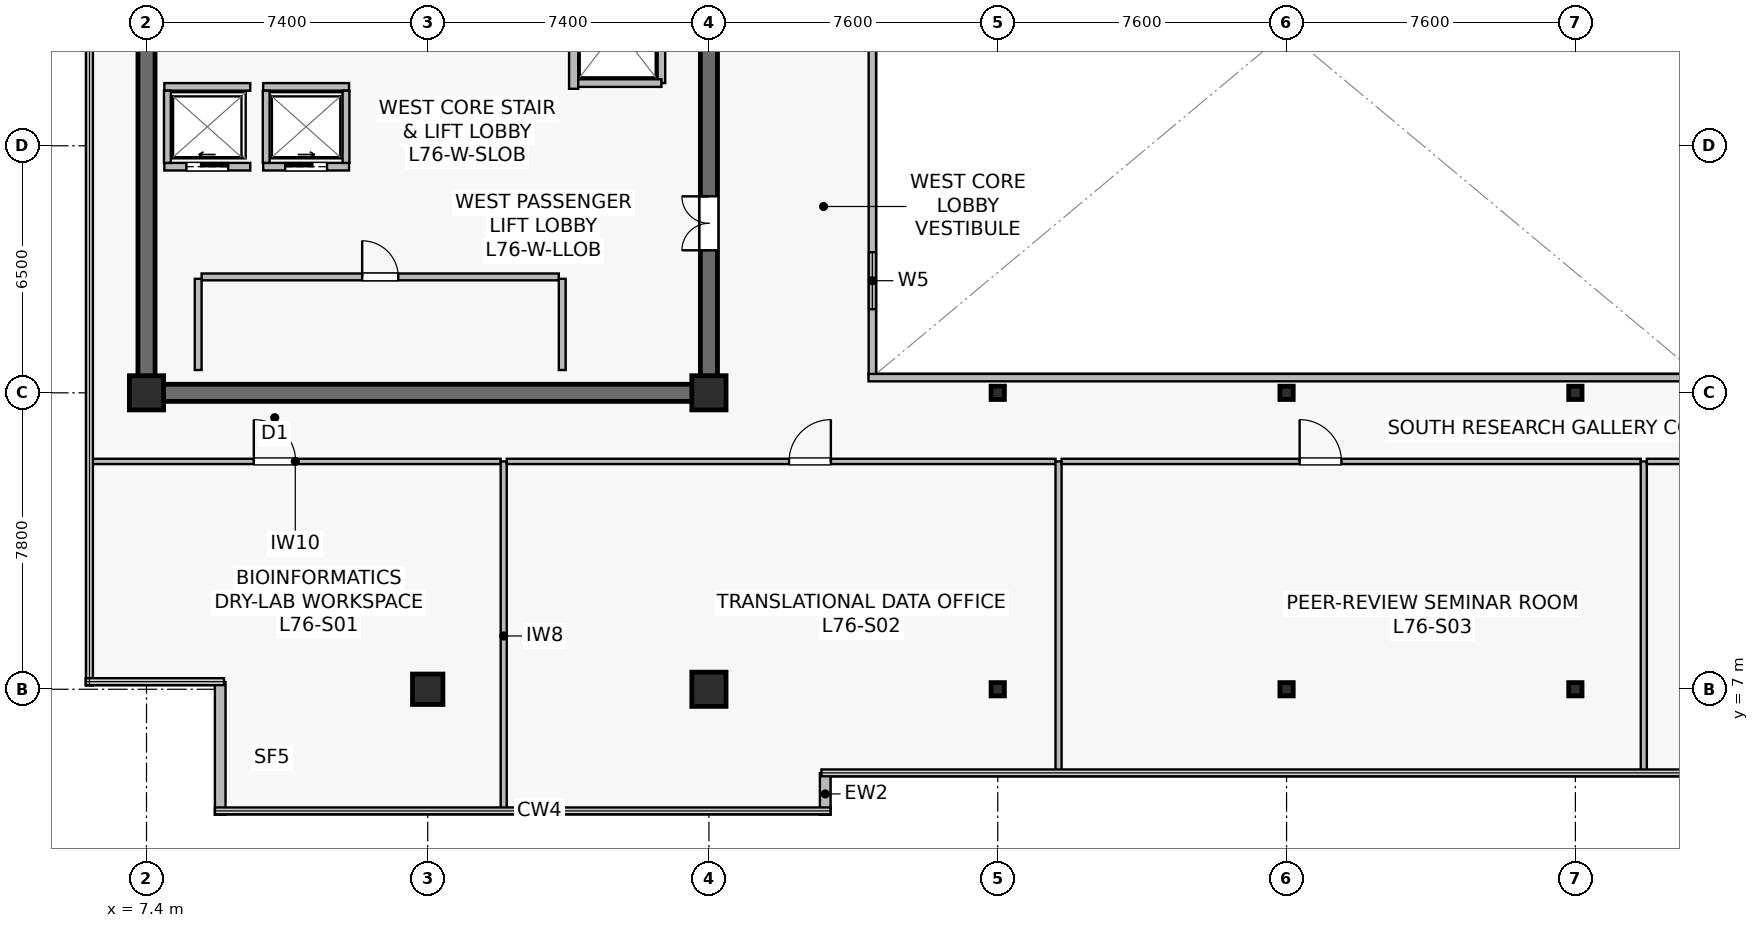
"""IFC4 building model, lengths in metres.
Left out: names, types, materials, properties, quantities, classifications, styles, units other than length and angle.
Written with IfcOpenShell. Run it as: python <this file> out.ifc"""

import sys

from ifc_helpers import new_model, si_unit, direction, frame, frame_2d, origin, origin_2d, place, context, subcontext, project, spatial, rectangle, i_section, extrude, source, transform, mapped, element, fill, save


model = new_model("IFC4")
c1 = context("Model", 3, precision=1e-05, world=origin(), true_north=direction((0.0, 1.0)))
c2 = subcontext(c1, "Body", "Model", "MODEL_VIEW")
j1 = project(units=[si_unit("LENGTHUNIT", "METRE"), si_unit("PLANEANGLEUNIT", "RADIAN")], contexts=[c1])
p1 = place(None, origin())
s1 = spatial("IfcSite", under=j1, at=p1, CompositionType="ELEMENT")
p2 = place(p1, origin())
s2 = spatial("IfcBuilding", under=s1, at=p2, CompositionType="ELEMENT")
p3 = place(p2, frame((0.0, 0.0, 318.6)))
s3 = spatial("IfcBuildingStorey", under=s2, at=p3, CompositionType="ELEMENT", Elevation=318.6)
p4 = place(p3, frame((7.175, 14.8, 0.0), z_axis=(0.0, 0.0, 1.0), x_axis=(1.0, 0.0, 0.0)))
e1 = element("IfcWall", 1, at=p4, inside=s3, PredefinedType="SHEAR", context=c2, shape_type="SweptSolid", body=[
    extrude(rectangle(XDim=15.25, YDim=0.45, at=frame_2d((7.625, 0.0))), origin(), (0.0, 0.0, 1.0), 3.9),
])
p5 = place(p3, frame((7.4, 15.025, 0.0), z_axis=(0.0, 0.0, 1.0), x_axis=(0.0, 1.0, 0.0)))
e2 = element("IfcWall", 2, at=p5, inside=s3, PredefinedType="SHEAR", context=c2, shape_type="SweptSolid", body=[
    extrude(rectangle(XDim=18.55, YDim=0.45, at=frame_2d((9.275, 0.0))), origin(), (0.0, 0.0, 1.0), 3.9),
])
p6 = place(p3, frame((22.2, 15.025, 0.0), z_axis=(0.0, 0.0, 1.0), x_axis=(0.0, 1.0, 0.0)))
e3 = element("IfcWall", 3, at=p6, inside=s3, PredefinedType="SHEAR", context=c2, shape_type="SweptSolid", body=[
    extrude(rectangle(XDim=18.55, YDim=0.45, at=frame_2d((9.275, 0.0))), origin(), (0.0, 0.0, 1.0), 3.9),
])
p7 = place(p6, frame((3.525, 0.0, 0.0)))
e4 = element("IfcOpeningElement", 4, at=p7, cuts=e3, PredefinedType="OPENING", context=c2, shape_type="SweptSolid", body=[
    extrude(rectangle(XDim=1.42, YDim=2.2, at=frame_2d((0.71, 1.1))), frame((0.0, 0.235, 0.0), z_axis=(0.0, -1.0, 0.0), x_axis=(1.0, 0.0, 0.0)), (0.0, 0.0, 1.0), 0.47),
])
m1 = source(origin(), c2, "Body", "SweptSolid", [
    extrude(rectangle(XDim=0.8, YDim=0.8, at=origin_2d()), origin(), (0.0, 0.0, 1.0), 4.2),
])
p8 = place(p3, frame((14.8, 7.0, 0.0), z_axis=(0.0, 0.0, 1.0), x_axis=(1.0, 0.0, 0.0)))
e5 = element("IfcColumn", 5, at=p8, inside=s3, PredefinedType="COLUMN", context=c2, shape_type="MappedRepresentation", body=[
    mapped(m1, transform((0.0, 0.0, 0.0), scale=1.0)),
])
m2 = source(origin(), c2, "Body", "SweptSolid", [
    extrude(rectangle(XDim=0.9, YDim=0.9, at=origin_2d()), origin(), (0.0, 0.0, 1.0), 4.2),
])
for number, where, z_axis, x_axis in (
    (6, (22.2, 7.0, 0.0), (0.0, 0.0, 1.0), (1.0, 0.0, 0.0)),
    (7, (7.4, 14.8, 0.0), (0.0, 0.0, 1.0), (1.0, 0.0, 0.0)),
    (8, (22.2, 14.8, 0.0), (0.0, 0.0, 1.0), (1.0, 0.0, 0.0)),
):
    element("IfcColumn", number, at=place(p3, frame(where, z_axis=z_axis, x_axis=x_axis)), inside=s3, PredefinedType="COLUMN", context=c2, shape_type="MappedRepresentation", body=[
        mapped(m2, transform((0.0, 0.0, 0.0), scale=1.0)),
    ])
m3 = source(origin(), c2, "Body", "SweptSolid", [
    extrude(i_section(OverallWidth=0.35, OverallDepth=0.35, WebThickness=0.012, FlangeThickness=0.019, at=origin_2d()), origin(), (0.0, 0.0, 1.0), 4.2),
])
for number, where, z_axis, x_axis in (
    (9, (29.8, 7.0, 0.0), (0.0, 0.0, 1.0), (1.0, 0.0, 0.0)),
    (10, (29.8, 14.8, 0.0), (0.0, 0.0, 1.0), (1.0, 0.0, 0.0)),
    (11, (37.4, 7.0, 0.0), (0.0, 0.0, 1.0), (1.0, 0.0, 0.0)),
    (12, (37.4, 14.8, 0.0), (0.0, 0.0, 1.0), (1.0, 0.0, 0.0)),
    (13, (45.0, 7.0, 0.0), (0.0, 0.0, 1.0), (1.0, 0.0, 0.0)),
    (14, (45.0, 14.8, 0.0), (0.0, 0.0, 1.0), (1.0, 0.0, 0.0)),
):
    element("IfcColumn", number, at=place(p3, frame(where, z_axis=z_axis, x_axis=x_axis)), inside=s3, PredefinedType="COLUMN", context=c2, shape_type="MappedRepresentation", body=[
        mapped(m3, transform((0.0, 0.0, 0.0), scale=1.0)),
    ])
p9 = place(p3, frame((25.26, 3.7, 0.0), z_axis=(0.0, 0.0, 1.0), x_axis=(0.0, 1.0, 0.0)))
e15 = element("IfcWall", 15, at=p9, inside=s3, PredefinedType="STANDARD", context=c2, shape_type="SweptSolid", body=[
    extrude(rectangle(XDim=1.093, YDim=0.28, at=frame_2d((0.546, 0.0))), origin(), (0.0, 0.0, 1.0), 3.9),
])
p10 = place(p3, frame((9.34, 7.188, 0.0), z_axis=(0.0, 0.0, 1.0), x_axis=(0.0, -1.0, 0.0)))
e16 = element("IfcWall", 16, at=p10, inside=s3, PredefinedType="STANDARD", context=c2, shape_type="SweptSolid", body=[
    extrude(rectangle(XDim=3.488, YDim=0.28, at=frame_2d((1.744, 0.0))), origin(), (0.0, 0.0, 1.0), 3.9),
])
p11 = place(p3, frame((18.64, 22.8, 0.0), z_axis=(0.0, 0.0, 1.0), x_axis=(0.0, 1.0, 0.0)))
e17 = element("IfcWall", 17, at=p11, inside=s3, PredefinedType="SOLIDWALL", context=c2, shape_type="SweptSolid", body=[
    extrude(rectangle(XDim=6.85, YDim=0.24, at=frame_2d((3.425, 0.0))), origin(), (0.0, 0.0, 1.0), 3.035),
])
p12 = place(p11, frame((4.85, 0.0, 0.0)))
e18 = element("IfcOpeningElement", 18, at=p12, cuts=e17, PredefinedType="OPENING", context=c2, shape_type="SweptSolid", body=[
    extrude(rectangle(XDim=1.1, YDim=2.22, at=frame_2d((0.55, 1.11))), frame((0.0, 0.13, 0.0), z_axis=(0.0, -1.0, 0.0), x_axis=(1.0, 0.0, 0.0)), (0.0, 0.0, 1.0), 0.26),
])
p13 = place(p11, frame((1.0, 0.0, 0.0)))
e19 = element("IfcOpeningElement", 19, at=p13, cuts=e17, PredefinedType="OPENING", context=c2, shape_type="SweptSolid", body=[
    extrude(rectangle(XDim=1.2, YDim=2.22, at=frame_2d((0.6, 1.11))), frame((0.0, 0.13, 0.0), z_axis=(0.0, -1.0, 0.0), x_axis=(1.0, 0.0, 0.0)), (0.0, 0.0, 1.0), 0.26),
])
p14 = place(p3, frame((7.87, 20.75, 0.0), z_axis=(0.0, 0.0, 1.0), x_axis=(1.0, 0.0, 0.0)))
e20 = element("IfcWall", 20, at=p14, inside=s3, PredefinedType="SOLIDWALL", context=c2, shape_type="SweptSolid", body=[
    extrude(rectangle(XDim=2.26, YDim=0.2, at=frame_2d((1.13, 0.0))), origin(), (0.0, 0.0, 1.0), 3.9),
])
p15 = place(p14, frame((0.58, 0.0, 0.0)))
e21 = element("IfcOpeningElement", 21, at=p15, cuts=e20, PredefinedType="OPENING", context=c2, shape_type="SweptSolid", body=[
    extrude(rectangle(XDim=1.1, YDim=2.22, at=frame_2d((0.55, 1.11))), frame((0.0, 0.11, 0.0), z_axis=(0.0, -1.0, 0.0), x_axis=(1.0, 0.0, 0.0)), (0.0, 0.0, 1.0), 0.22),
])
p16 = place(p3, frame((7.87, 22.85, 0.0), z_axis=(0.0, 0.0, 1.0), x_axis=(1.0, 0.0, 0.0)))
e22 = element("IfcWall", 22, at=p16, inside=s3, PredefinedType="SOLIDWALL", context=c2, shape_type="SweptSolid", body=[
    extrude(rectangle(XDim=2.26, YDim=0.2, at=frame_2d((1.13, 0.0))), origin(), (0.0, 0.0, 1.0), 3.9),
])
p17 = place(p3, frame((7.95, 20.85, 0.0), z_axis=(0.0, 0.0, 1.0), x_axis=(0.0, 1.0, 0.0)))
e23 = element("IfcWall", 23, at=p17, inside=s3, PredefinedType="SOLIDWALL", context=c2, shape_type="SweptSolid", body=[
    extrude(rectangle(XDim=1.9, YDim=0.18, at=frame_2d((0.95, 0.0))), origin(), (0.0, 0.0, 1.0), 3.9),
])
p18 = place(p3, frame((10.47, 20.75, 0.0), z_axis=(0.0, 0.0, 1.0), x_axis=(1.0, 0.0, 0.0)))
e24 = element("IfcWall", 24, at=p18, inside=s3, PredefinedType="SOLIDWALL", context=c2, shape_type="SweptSolid", body=[
    extrude(rectangle(XDim=2.26, YDim=0.2, at=frame_2d((1.13, 0.0))), origin(), (0.0, 0.0, 1.0), 3.9),
])
p19 = place(p18, frame((0.58, 0.0, 0.0)))
e25 = element("IfcOpeningElement", 25, at=p19, cuts=e24, PredefinedType="OPENING", context=c2, shape_type="SweptSolid", body=[
    extrude(rectangle(XDim=1.1, YDim=2.22, at=frame_2d((0.55, 1.11))), frame((0.0, 0.11, 0.0), z_axis=(0.0, -1.0, 0.0), x_axis=(1.0, 0.0, 0.0)), (0.0, 0.0, 1.0), 0.22),
])
p20 = place(p3, frame((10.47, 22.85, 0.0), z_axis=(0.0, 0.0, 1.0), x_axis=(1.0, 0.0, 0.0)))
e26 = element("IfcWall", 26, at=p20, inside=s3, PredefinedType="SOLIDWALL", context=c2, shape_type="SweptSolid", body=[
    extrude(rectangle(XDim=2.26, YDim=0.2, at=frame_2d((1.13, 0.0))), origin(), (0.0, 0.0, 1.0), 3.9),
])
for number, where, z_axis, x_axis in (
    (27, (10.55, 20.85, 0.0), (0.0, 0.0, 1.0), (0.0, 1.0, 0.0)),
    (28, (12.65, 20.85, 0.0), (0.0, 0.0, 1.0), (0.0, 1.0, 0.0)),
):
    element("IfcWall", number, at=place(p3, frame(where, z_axis=z_axis, x_axis=x_axis)), inside=s3, PredefinedType="SOLIDWALL", context=c2, shape_type="SweptSolid", body=[
        extrude(rectangle(XDim=1.9, YDim=0.18, at=frame_2d((0.95, 0.0))), origin(), (0.0, 0.0, 1.0), 3.9),
    ])
p21 = place(p3, frame((20.95, 22.95, 0.0), z_axis=(0.0, 0.0, 1.0), x_axis=(0.0, 1.0, 0.0)))
e29 = element("IfcWall", 29, at=p21, inside=s3, PredefinedType="SOLIDWALL", context=c2, shape_type="SweptSolid", body=[
    extrude(rectangle(XDim=2.9, YDim=0.2, at=frame_2d((1.45, 0.0))), origin(), (0.0, 0.0, 1.0), 3.035),
])
p22 = place(p3, frame((18.76, 22.95, 0.0), z_axis=(0.0, 0.0, 1.0), x_axis=(1.0, 0.0, 0.0)))
e30 = element("IfcWall", 30, at=p22, inside=s3, PredefinedType="SOLIDWALL", context=c2, shape_type="SweptSolid", body=[
    extrude(rectangle(XDim=2.19, YDim=0.2, at=frame_2d((1.095, 0.0))), origin(), (0.0, 0.0, 1.0), 3.9),
])
p23 = place(p3, frame((8.85, 17.85, 0.0), z_axis=(0.0, 0.0, 1.0), x_axis=(1.0, 0.0, 0.0)))
e31 = element("IfcWall", 31, at=p23, inside=s3, PredefinedType="SOLIDWALL", context=c2, shape_type="SweptSolid", body=[
    extrude(rectangle(XDim=9.4, YDim=0.18, at=frame_2d((4.7, 0.0))), origin(), (0.0, 0.0, 1.0), 3.297),
])
p24 = place(p23, frame((4.225, 0.0, 0.0)))
e32 = element("IfcOpeningElement", 32, at=p24, cuts=e31, PredefinedType="OPENING", context=c2, shape_type="SweptSolid", body=[
    extrude(rectangle(XDim=0.95, YDim=2.15, at=frame_2d((0.475, 1.075))), frame((0.0, 0.1, 0.0), z_axis=(0.0, -1.0, 0.0), x_axis=(1.0, 0.0, 0.0)), (0.0, 0.0, 1.0), 0.2),
])
for number, where, z_axis, x_axis in (
    (33, (18.34, 15.4, 0.0), (0.0, 0.0, 1.0), (0.0, 1.0, 0.0)),
    (34, (8.76, 15.4, 0.0), (0.0, 0.0, 1.0), (0.0, 1.0, 0.0)),
):
    element("IfcWall", number, at=place(p3, frame(where, z_axis=z_axis, x_axis=x_axis)), inside=s3, PredefinedType="SOLIDWALL", context=c2, shape_type="SweptSolid", body=[
        extrude(rectangle(XDim=2.4, YDim=0.18, at=frame_2d((1.2, 0.0))), origin(), (0.0, 0.0, 1.0), 3.9),
    ])
p25 = place(p3, frame((26.5, 15.2, 0.0), z_axis=(0.0, 0.0, 1.0), x_axis=(0.0, 1.0, 0.0)))
e35 = element("IfcWall", 35, at=p25, inside=s3, PredefinedType="SOLIDWALL", context=c2, shape_type="SweptSolid", body=[
    extrude(rectangle(XDim=18.2, YDim=0.195, at=frame_2d((9.1, 0.0))), origin(), (0.0, 0.0, 1.0), 3.9),
])
p26 = place(p25, frame((1.8, 0.0, 0.9)))
e36 = element("IfcOpeningElement", 36, at=p26, cuts=e35, PredefinedType="OPENING", context=c2, shape_type="SweptSolid", body=[
    extrude(rectangle(XDim=1.5, YDim=1.4, at=frame_2d((0.75, 0.7))), frame((0.0, 0.107, 0.0), z_axis=(0.0, -1.0, 0.0), x_axis=(1.0, 0.0, 0.0)), (0.0, 0.0, 1.0), 0.215),
])
p27 = place(p25, frame((13.2, 0.0, 0.9)))
e37 = element("IfcOpeningElement", 37, at=p27, cuts=e35, PredefinedType="OPENING", context=c2, shape_type="SweptSolid", body=[
    extrude(rectangle(XDim=1.5, YDim=1.4, at=frame_2d((0.75, 0.7))), frame((0.0, 0.107, 0.0), z_axis=(0.0, -1.0, 0.0), x_axis=(1.0, 0.0, 0.0)), (0.0, 0.0, 1.0), 0.215),
])
p28 = place(p3, frame((26.4, 15.2, 0.0), z_axis=(0.0, 0.0, 1.0), x_axis=(1.0, 0.0, 0.0)))
e38 = element("IfcWall", 38, at=p28, inside=s3, PredefinedType="SOLIDWALL", context=c2, shape_type="SweptSolid", body=[
    extrude(rectangle(XDim=22.0, YDim=0.195, at=frame_2d((11.0, 0.0))), origin(), (0.0, 0.0, 1.0), 3.9),
])
p29 = place(p3, frame((5.91, 12.995, 0.0), z_axis=(0.0, 0.0, 1.0), x_axis=(1.0, 0.0, 0.0)))
e39 = element("IfcWall", 39, at=p29, inside=s3, PredefinedType="PARTITIONING", context=c2, shape_type="SweptSolid", body=[
    extrude(rectangle(XDim=10.81, YDim=0.14, at=frame_2d((5.405, 0.0))), origin(), (0.0, 0.0, 1.0), 3.297),
])
p30 = place(p29, frame((4.314, 0.0, 0.0)))
e40 = element("IfcOpeningElement", 40, at=p30, cuts=e39, PredefinedType="OPENING", context=c2, shape_type="SweptSolid", body=[
    extrude(rectangle(XDim=1.1, YDim=2.18, at=frame_2d((0.55, 1.09))), frame((0.0, 0.08, 0.0), z_axis=(0.0, -1.0, 0.0), x_axis=(1.0, 0.0, 0.0)), (0.0, 0.0, 1.0), 0.16),
])
p31 = place(p3, frame((16.8, 3.81, 0.0), z_axis=(0.0, 0.0, 1.0), x_axis=(0.0, 1.0, 0.0)))
e41 = element("IfcWall", 41, at=p31, inside=s3, PredefinedType="PARTITIONING", context=c2, shape_type="SweptSolid", body=[
    extrude(rectangle(XDim=9.185, YDim=0.16, at=frame_2d((4.593, 0.0))), origin(), (0.0, 0.0, 1.0), 3.235),
])
p32 = place(p3, frame((16.88, 12.995, 0.0), z_axis=(0.0, 0.0, 1.0), x_axis=(1.0, 0.0, 0.0)))
e42 = element("IfcWall", 42, at=p32, inside=s3, PredefinedType="PARTITIONING", context=c2, shape_type="SweptSolid", body=[
    extrude(rectangle(XDim=14.44, YDim=0.14, at=frame_2d((7.22, 0.0))), origin(), (0.0, 0.0, 1.0), 3.297),
])
p33 = place(p32, frame((7.428, 0.0, 0.0)))
e43 = element("IfcOpeningElement", 43, at=p33, cuts=e42, PredefinedType="OPENING", context=c2, shape_type="SweptSolid", body=[
    extrude(rectangle(XDim=1.1, YDim=2.18, at=frame_2d((0.55, 1.09))), frame((0.0, 0.08, 0.0), z_axis=(0.0, -1.0, 0.0), x_axis=(1.0, 0.0, 0.0)), (0.0, 0.0, 1.0), 0.16),
])
p34 = place(p3, frame((31.4, 4.81, 0.0), z_axis=(0.0, 0.0, 1.0), x_axis=(0.0, 1.0, 0.0)))
e44 = element("IfcWall", 44, at=p34, inside=s3, PredefinedType="PARTITIONING", context=c2, shape_type="SweptSolid", body=[
    extrude(rectangle(XDim=8.185, YDim=0.16, at=frame_2d((4.093, 0.0))), origin(), (0.0, 0.0, 1.0), 3.235),
])
p35 = place(p3, frame((31.48, 12.995, 0.0), z_axis=(0.0, 0.0, 1.0), x_axis=(1.0, 0.0, 0.0)))
e45 = element("IfcWall", 45, at=p35, inside=s3, PredefinedType="PARTITIONING", context=c2, shape_type="SweptSolid", body=[
    extrude(rectangle(XDim=15.24, YDim=0.14, at=frame_2d((7.62, 0.0))), origin(), (0.0, 0.0, 1.0), 3.297),
])
p36 = place(p35, frame((6.264, 0.0, 0.0)))
e46 = element("IfcOpeningElement", 46, at=p36, cuts=e45, PredefinedType="OPENING", context=c2, shape_type="SweptSolid", body=[
    extrude(rectangle(XDim=1.1, YDim=2.18, at=frame_2d((0.55, 1.09))), frame((0.0, 0.08, 0.0), z_axis=(0.0, -1.0, 0.0), x_axis=(1.0, 0.0, 0.0)), (0.0, 0.0, 1.0), 0.16),
])
p37 = place(p3, frame((46.8, 4.81, 0.0), z_axis=(0.0, 0.0, 1.0), x_axis=(0.0, 1.0, 0.0)))
e47 = element("IfcWall", 47, at=p37, inside=s3, PredefinedType="PARTITIONING", context=c2, shape_type="SweptSolid", body=[
    extrude(rectangle(XDim=8.185, YDim=0.16, at=frame_2d((4.093, 0.0))), origin(), (0.0, 0.0, 1.0), 3.235),
])
p38 = place(p3, frame((46.88, 12.995, 0.0), z_axis=(0.0, 0.0, 1.0), x_axis=(1.0, 0.0, 0.0)))
e48 = element("IfcWall", 48, at=p38, inside=s3, PredefinedType="PARTITIONING", context=c2, shape_type="SweptSolid", body=[
    extrude(rectangle(XDim=22.01, YDim=0.14, at=frame_2d((11.005, 0.0))), origin(), (0.0, 0.0, 1.0), 3.297),
])
p39 = place(p38, frame((11.667, 0.0, 0.0)))
e49 = element("IfcOpeningElement", 49, at=p39, cuts=e48, PredefinedType="OPENING", context=c2, shape_type="SweptSolid", body=[
    extrude(rectangle(XDim=1.1, YDim=2.18, at=frame_2d((0.55, 1.09))), frame((0.0, 0.08, 0.0), z_axis=(0.0, -1.0, 0.0), x_axis=(1.0, 0.0, 0.0)), (0.0, 0.0, 1.0), 0.16),
])
m4 = source(origin(), c2, "Body", "SweptSolid", [
    extrude(rectangle(XDim=1.5, YDim=1.4, at=frame_2d((0.75, 0.7))), frame((0.0, 0.03, 0.0), z_axis=(0.0, -1.0, 0.0), x_axis=(1.0, 0.0, 0.0)), (0.0, 0.0, 1.0), 0.06),
])
p40 = place(p26, origin())
e50 = element("IfcWindow", 50, at=p40, inside=s3, PartitioningType="SINGLE_PANEL", PredefinedType="WINDOW", context=c2, shape_type="MappedRepresentation", body=[
    mapped(m4, transform((0.0, 0.0, 0.0), scale=1.0)),
])
fill(e36, e50)
m5 = source(origin(), c2, "Body", "SweptSolid", [
    extrude(rectangle(XDim=1.1, YDim=2.22, at=frame_2d((0.55, 1.11))), frame((0.0, 0.025, 0.0), z_axis=(0.0, -1.0, 0.0), x_axis=(1.0, 0.0, 0.0)), (0.0, 0.0, 1.0), 0.05),
])
p41 = place(p15, origin())
e51 = element("IfcDoor", 51, at=p41, inside=s3, OperationType="SLIDING_TO_LEFT", PredefinedType="USERDEFINED", context=c2, shape_type="MappedRepresentation", body=[
    mapped(m5, transform((0.0, 0.0, 0.0), scale=1.0)),
])
fill(e21, e51)
p42 = place(p19, origin())
e52 = element("IfcDoor", 52, at=p42, inside=s3, OperationType="SLIDING_TO_RIGHT", PredefinedType="USERDEFINED", context=c2, shape_type="MappedRepresentation", body=[
    mapped(m5, transform((0.0, 0.0, 0.0), scale=1.0)),
])
fill(e25, e52)
m6 = source(origin(), c2, "Body", "SweptSolid", [
    extrude(rectangle(XDim=0.95, YDim=2.15, at=frame_2d((0.475, 1.075))), frame((0.0, 0.025, 0.0), z_axis=(0.0, -1.0, 0.0), x_axis=(1.0, 0.0, 0.0)), (0.0, 0.0, 1.0), 0.05),
])
p43 = place(p24, origin())
e53 = element("IfcDoor", 53, at=p43, inside=s3, OperationType="SINGLE_SWING_LEFT", PredefinedType="DOOR", context=c2, shape_type="MappedRepresentation", body=[
    mapped(m6, transform((0.0, 0.0, 0.0), scale=1.0)),
])
fill(e32, e53)
m7 = source(origin(), c2, "Body", "SweptSolid", [
    extrude(rectangle(XDim=1.42, YDim=2.2, at=frame_2d((0.71, 1.1))), frame((0.0, 0.025, 0.0), z_axis=(0.0, -1.0, 0.0), x_axis=(1.0, 0.0, 0.0)), (0.0, 0.0, 1.0), 0.05),
])
p44 = place(p7, origin())
e54 = element("IfcDoor", 54, at=p44, inside=s3, OperationType="DOUBLE_DOOR_SINGLE_SWING", PredefinedType="DOOR", context=c2, shape_type="MappedRepresentation", body=[
    mapped(m7, transform((0.0, 0.0, 0.0), scale=1.0)),
])
fill(e4, e54)
m8 = source(origin(), c2, "Body", "SweptSolid", [
    extrude(rectangle(XDim=1.1, YDim=2.18, at=frame_2d((0.55, 1.09))), frame((0.0, 0.025, 0.0), z_axis=(0.0, -1.0, 0.0), x_axis=(1.0, 0.0, 0.0)), (0.0, 0.0, 1.0), 0.05),
])
p45 = place(p30, origin())
e55 = element("IfcDoor", 55, at=p45, inside=s3, OperationType="SINGLE_SWING_LEFT", PredefinedType="DOOR", context=c2, shape_type="MappedRepresentation", body=[
    mapped(m8, transform((0.0, 0.0, 0.0), scale=1.0)),
])
fill(e40, e55)
p46 = place(p33, origin())
e56 = element("IfcDoor", 56, at=p46, inside=s3, OperationType="SINGLE_SWING_RIGHT", PredefinedType="DOOR", context=c2, shape_type="MappedRepresentation", body=[
    mapped(m8, transform((0.0, 0.0, 0.0), scale=1.0)),
])
fill(e43, e56)
p47 = place(p36, origin())
e57 = element("IfcDoor", 57, at=p47, inside=s3, OperationType="SINGLE_SWING_LEFT", PredefinedType="DOOR", context=c2, shape_type="MappedRepresentation", body=[
    mapped(m8, transform((0.0, 0.0, 0.0), scale=1.0)),
])
fill(e46, e57)
save(model, sys.argv[1])
